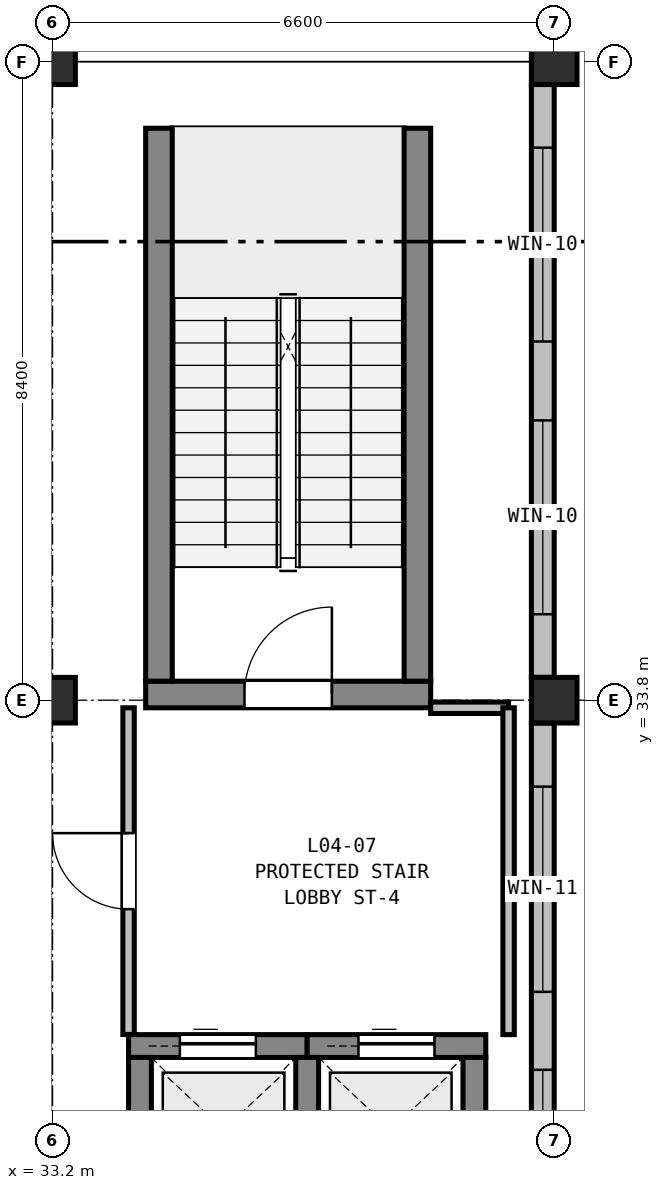
"""IFC4 building model, lengths in metres.
Left out: names, types, materials, properties, quantities, classifications, styles, units other than length and angle.
Written with IfcOpenShell. Run it as: python <this file> out.ifc"""

import sys

from ifc_helpers import new_model, si_unit, direction, frame, frame_2d, origin, origin_2d, place, context, subcontext, project, spatial, rectangle, extrude, element, fill, save


model = new_model("IFC4")
c1 = context("Model", 3, precision=1e-05, world=origin(), true_north=direction((0.0, 1.0)))
c2 = subcontext(c1, "Body", "Model", "MODEL_VIEW")
j1 = project(units=[si_unit("LENGTHUNIT", "METRE"), si_unit("PLANEANGLEUNIT", "RADIAN")], contexts=[c1])
p1 = place(None, origin())
s1 = spatial("IfcSite", under=j1, at=p1, CompositionType="ELEMENT")
p2 = place(p1, origin())
s2 = spatial("IfcBuilding", under=s1, at=p2, CompositionType="ELEMENT")
p3 = place(p2, frame((0.0, 0.0, 19.5)))
s3 = spatial("IfcBuildingStorey", under=s2, at=p3, CompositionType="ELEMENT", Elevation=19.5)
for number, where, z_axis, x_axis in (
    (1, (33.2, 33.8, 0.0), (0.0, 0.0, 1.0), (1.0, 0.0, 0.0)),
    (2, (33.2, 42.2, 0.0), (0.0, 0.0, 1.0), (1.0, 0.0, 0.0)),
    (3, (39.8, 33.8, 0.0), (0.0, 0.0, 1.0), (1.0, 0.0, 0.0)),
    (4, (39.8, 42.2, 0.0), (0.0, 0.0, 1.0), (1.0, 0.0, 0.0)),
):
    element("IfcColumn", number, at=place(p3, frame(where, z_axis=z_axis, x_axis=x_axis)), inside=s3, PredefinedType="COLUMN", context=c2, shape_type="SweptSolid", body=[
        extrude(rectangle(XDim=0.6, YDim=0.6, at=origin_2d()), origin(), (0.0, 0.0, 1.0), 4.5),
    ])
p4 = place(p3, frame((34.425, 33.875, 0.0), z_axis=(0.0, 0.0, 1.0), x_axis=(1.0, 0.0, 0.0)))
e5 = element("IfcWall", 5, at=p4, inside=s3, PredefinedType="SHEAR", context=c2, shape_type="SweptSolid", body=[
    extrude(rectangle(XDim=3.75, YDim=0.35, at=frame_2d((1.875, 0.0))), origin(), (0.0, 0.0, 1.0), 4.5),
])
p5 = place(p4, frame((1.3, 0.0, 0.0)))
e6 = element("IfcOpeningElement", 6, at=p5, cuts=e5, PredefinedType="OPENING", context=c2, shape_type="SweptSolid", body=[
    extrude(rectangle(XDim=1.15, YDim=2.15, at=frame_2d((0.575, 1.075))), frame((0.0, 0.185, 0.0), z_axis=(0.0, -1.0, 0.0), x_axis=(1.0, 0.0, 0.0)), (0.0, 0.0, 1.0), 0.37),
])
p6 = place(p3, frame((34.425, 41.5, 0.0), z_axis=(0.0, 0.0, 1.0), x_axis=(1.0, 0.0, 0.0)))
e7 = element("IfcWall", 7, at=p6, inside=s3, PredefinedType="SHEAR", context=c2, shape_type="SweptSolid", body=[
    extrude(rectangle(XDim=3.75, YDim=0.35, at=frame_2d((1.875, 0.0))), origin(), (0.0, 0.0, 1.0), 4.5),
])
for number, where, z_axis, x_axis in (
    (8, (34.6, 34.05, 0.0), (0.0, 0.0, 1.0), (0.0, 1.0, 0.0)),
    (9, (38.0, 34.05, 0.0), (0.0, 0.0, 1.0), (0.0, 1.0, 0.0)),
):
    element("IfcWall", number, at=place(p3, frame(where, z_axis=z_axis, x_axis=x_axis)), inside=s3, PredefinedType="SHEAR", context=c2, shape_type="SweptSolid", body=[
        extrude(rectangle(XDim=7.275, YDim=0.35, at=frame_2d((3.637, 0.0))), origin(), (0.0, 0.0, 1.0), 4.5),
    ])
p7 = place(p3, frame((34.2, 29.25, 0.0), z_axis=(0.0, 0.0, 1.0), x_axis=(1.0, 0.0, 0.0)))
e10 = element("IfcWall", 10, at=p7, inside=s3, PredefinedType="SHEAR", context=c2, shape_type="SweptSolid", body=[
    extrude(rectangle(XDim=2.35, YDim=0.3, at=frame_2d((1.175, 0.0))), origin(), (0.0, 0.0, 1.0), 4.5),
])
p8 = place(p7, frame((0.675, 0.0, 0.0)))
e11 = element("IfcOpeningElement", 11, at=p8, cuts=e10, PredefinedType="OPENING", context=c2, shape_type="SweptSolid", body=[
    extrude(rectangle(XDim=1.0, YDim=2.1, at=frame_2d((0.5, 1.05))), frame((0.0, 0.16, 0.0), z_axis=(0.0, -1.0, 0.0), x_axis=(1.0, 0.0, 0.0)), (0.0, 0.0, 1.0), 0.32),
])
p9 = place(p3, frame((36.55, 29.25, 0.0), z_axis=(0.0, 0.0, 1.0), x_axis=(1.0, 0.0, 0.0)))
e12 = element("IfcWall", 12, at=p9, inside=s3, PredefinedType="SHEAR", context=c2, shape_type="SweptSolid", body=[
    extrude(rectangle(XDim=2.35, YDim=0.3, at=frame_2d((1.175, 0.0))), origin(), (0.0, 0.0, 1.0), 4.5),
])
p10 = place(p9, frame((0.675, 0.0, 0.0)))
e13 = element("IfcOpeningElement", 13, at=p10, cuts=e12, PredefinedType="OPENING", context=c2, shape_type="SweptSolid", body=[
    extrude(rectangle(XDim=1.0, YDim=2.1, at=frame_2d((0.5, 1.05))), frame((0.0, 0.16, 0.0), z_axis=(0.0, -1.0, 0.0), x_axis=(1.0, 0.0, 0.0)), (0.0, 0.0, 1.0), 0.32),
])
for number, where, z_axis, x_axis in (
    (14, (34.35, 27.2, 0.0), (0.0, 0.0, 1.0), (0.0, 1.0, 0.0)),
    (15, (36.55, 27.2, 0.0), (0.0, 0.0, 1.0), (0.0, 1.0, 0.0)),
    (16, (38.75, 27.2, 0.0), (0.0, 0.0, 1.0), (0.0, 1.0, 0.0)),
):
    element("IfcWall", number, at=place(p3, frame(where, z_axis=z_axis, x_axis=x_axis)), inside=s3, PredefinedType="SHEAR", context=c2, shape_type="SweptSolid", body=[
        extrude(rectangle(XDim=1.9, YDim=0.3, at=frame_2d((0.95, 0.0))), origin(), (0.0, 0.0, 1.0), 4.5),
    ])
p11 = place(p3, frame((33.2, 42.05, 0.0), z_axis=(0.0, 0.0, 1.0), x_axis=(1.0, 0.0, 0.0)))
e17 = element("IfcWall", 17, at=p11, inside=s3, PredefinedType="STANDARD", context=c2, shape_type="SweptSolid", body=[
    extrude(rectangle(XDim=6.6, YDim=0.3, at=frame_2d((3.3, 0.0))), origin(), (0.0, 0.0, 1.0), 3.735),
])
p12 = place(p11, frame((1.24, 0.0, 0.9)))
e18 = element("IfcOpeningElement", 18, at=p12, cuts=e17, PredefinedType="OPENING", context=c2, shape_type="SweptSolid", body=[
    extrude(rectangle(XDim=2.4, YDim=2.1, at=frame_2d((1.2, 1.05))), frame((0.0, 0.16, 0.0), z_axis=(0.0, -1.0, 0.0), x_axis=(1.0, 0.0, 0.0)), (0.0, 0.0, 1.0), 0.32),
])
p13 = place(p3, frame((39.65, 41.9, 0.0), z_axis=(0.0, 0.0, 1.0), x_axis=(0.0, -1.0, 0.0)))
e19 = element("IfcWall", 19, at=p13, inside=s3, PredefinedType="STANDARD", context=c2, shape_type="SweptSolid", body=[
    extrude(rectangle(XDim=7.8, YDim=0.3, at=frame_2d((3.9, 0.0))), origin(), (0.0, 0.0, 1.0), 3.885),
])
p14 = place(p13, frame((0.831, 0.0, 0.75)))
e20 = element("IfcOpeningElement", 20, at=p14, cuts=e19, PredefinedType="OPENING", context=c2, shape_type="SweptSolid", body=[
    extrude(rectangle(XDim=2.55, YDim=2.15, at=frame_2d((1.275, 1.075))), frame((0.0, 0.16, 0.0), z_axis=(0.0, -1.0, 0.0), x_axis=(1.0, 0.0, 0.0)), (0.0, 0.0, 1.0), 0.32),
])
p15 = place(p13, frame((4.419, 0.0, 0.75)))
e21 = element("IfcOpeningElement", 21, at=p15, cuts=e19, PredefinedType="OPENING", context=c2, shape_type="SweptSolid", body=[
    extrude(rectangle(XDim=2.55, YDim=2.15, at=frame_2d((1.275, 1.075))), frame((0.0, 0.16, 0.0), z_axis=(0.0, -1.0, 0.0), x_axis=(1.0, 0.0, 0.0)), (0.0, 0.0, 1.0), 0.32),
])
p16 = place(p3, frame((39.65, 33.5, 0.0), z_axis=(0.0, 0.0, 1.0), x_axis=(0.0, -1.0, 0.0)))
e22 = element("IfcWall", 22, at=p16, inside=s3, PredefinedType="STANDARD", context=c2, shape_type="SweptSolid", body=[
    extrude(rectangle(XDim=8.1, YDim=0.3, at=frame_2d((4.05, 0.0))), origin(), (0.0, 0.0, 1.0), 3.885),
])
p17 = place(p16, frame((0.837, 0.0, 0.75)))
e23 = element("IfcOpeningElement", 23, at=p17, cuts=e22, PredefinedType="OPENING", context=c2, shape_type="SweptSolid", body=[
    extrude(rectangle(XDim=2.7, YDim=2.2, at=frame_2d((1.35, 1.1))), frame((0.0, 0.16, 0.0), z_axis=(0.0, -1.0, 0.0), x_axis=(1.0, 0.0, 0.0)), (0.0, 0.0, 1.0), 0.32),
])
p18 = place(p16, frame((4.563, 0.0, 0.75)))
e24 = element("IfcOpeningElement", 24, at=p18, cuts=e22, PredefinedType="OPENING", context=c2, shape_type="SweptSolid", body=[
    extrude(rectangle(XDim=2.7, YDim=2.2, at=frame_2d((1.35, 1.1))), frame((0.0, 0.16, 0.0), z_axis=(0.0, -1.0, 0.0), x_axis=(1.0, 0.0, 0.0)), (0.0, 0.0, 1.0), 0.32),
])
p19 = place(p3, frame((38.175, 33.7, 0.0), z_axis=(0.0, 0.0, 1.0), x_axis=(1.0, 0.0, 0.0)))
e25 = element("IfcWall", 25, at=p19, inside=s3, PredefinedType="PARTITIONING", context=c2, shape_type="SweptSolid", body=[
    extrude(rectangle(XDim=1.025, YDim=0.15, at=frame_2d((0.512, 0.0))), origin(), (0.0, 0.0, 1.0), 3.885),
])
p20 = place(p3, frame((39.2, 33.7, 0.0), z_axis=(0.0, 0.0, 1.0), x_axis=(0.0, -1.0, 0.0)))
e26 = element("IfcWall", 26, at=p20, inside=s3, PredefinedType="PARTITIONING", context=c2, shape_type="SweptSolid", body=[
    extrude(rectangle(XDim=4.3, YDim=0.15, at=frame_2d((2.15, 0.0))), origin(), (0.0, 0.0, 1.0), 3.885),
])
p21 = place(p3, frame((34.2, 29.402, 0.0), z_axis=(0.0, 0.0, 1.0), x_axis=(0.0, 1.0, 0.0)))
e27 = element("IfcWall", 27, at=p21, inside=s3, PredefinedType="PARTITIONING", context=c2, shape_type="SweptSolid", body=[
    extrude(rectangle(XDim=4.298, YDim=0.15, at=frame_2d((2.149, 0.0))), origin(), (0.0, 0.0, 1.0), 3.885),
])
p22 = place(p21, frame((1.649, 0.0, 0.0)))
e28 = element("IfcOpeningElement", 28, at=p22, cuts=e27, PredefinedType="OPENING", context=c2, shape_type="SweptSolid", body=[
    extrude(rectangle(XDim=1.0, YDim=2.1, at=frame_2d((0.5, 1.05))), frame((0.0, 0.085, 0.0), z_axis=(0.0, -1.0, 0.0), x_axis=(1.0, 0.0, 0.0)), (0.0, 0.0, 1.0), 0.17),
])
p23 = place(p12, origin())
e29 = element("IfcWindow", 29, at=p23, inside=s3, PartitioningType="SINGLE_PANEL", PredefinedType="WINDOW", context=c2, shape_type="SweptSolid", body=[
    extrude(rectangle(XDim=2.4, YDim=2.1, at=frame_2d((1.2, 1.05))), frame((0.0, 0.03, 0.0), z_axis=(0.0, -1.0, 0.0), x_axis=(1.0, 0.0, 0.0)), (0.0, 0.0, 1.0), 0.06),
])
fill(e18, e29)
p24 = place(p14, origin())
e30 = element("IfcWindow", 30, at=p24, inside=s3, PartitioningType="SINGLE_PANEL", PredefinedType="WINDOW", context=c2, shape_type="SweptSolid", body=[
    extrude(rectangle(XDim=2.55, YDim=2.15, at=frame_2d((1.275, 1.075))), frame((0.0, 0.03, 0.0), z_axis=(0.0, -1.0, 0.0), x_axis=(1.0, 0.0, 0.0)), (0.0, 0.0, 1.0), 0.06),
])
fill(e20, e30)
p25 = place(p15, origin())
e31 = element("IfcWindow", 31, at=p25, inside=s3, PartitioningType="SINGLE_PANEL", PredefinedType="WINDOW", context=c2, shape_type="SweptSolid", body=[
    extrude(rectangle(XDim=2.55, YDim=2.15, at=frame_2d((1.275, 1.075))), frame((0.0, 0.03, 0.0), z_axis=(0.0, -1.0, 0.0), x_axis=(1.0, 0.0, 0.0)), (0.0, 0.0, 1.0), 0.06),
])
fill(e21, e31)
p26 = place(p17, origin())
e32 = element("IfcWindow", 32, at=p26, inside=s3, PartitioningType="SINGLE_PANEL", PredefinedType="WINDOW", context=c2, shape_type="SweptSolid", body=[
    extrude(rectangle(XDim=2.7, YDim=2.2, at=frame_2d((1.35, 1.1))), frame((0.0, 0.03, 0.0), z_axis=(0.0, -1.0, 0.0), x_axis=(1.0, 0.0, 0.0)), (0.0, 0.0, 1.0), 0.06),
])
fill(e23, e32)
p27 = place(p18, origin())
e33 = element("IfcWindow", 33, at=p27, inside=s3, PartitioningType="SINGLE_PANEL", PredefinedType="WINDOW", context=c2, shape_type="SweptSolid", body=[
    extrude(rectangle(XDim=2.7, YDim=2.2, at=frame_2d((1.35, 1.1))), frame((0.0, 0.03, 0.0), z_axis=(0.0, -1.0, 0.0), x_axis=(1.0, 0.0, 0.0)), (0.0, 0.0, 1.0), 0.06),
])
fill(e24, e33)
p28 = place(p5, origin())
e34 = element("IfcDoor", 34, at=p28, inside=s3, OperationType="SINGLE_SWING_RIGHT", PredefinedType="DOOR", context=c2, shape_type="SweptSolid", body=[
    extrude(rectangle(XDim=1.15, YDim=2.15, at=frame_2d((0.575, 1.075))), frame((0.0, 0.025, 0.0), z_axis=(0.0, -1.0, 0.0), x_axis=(1.0, 0.0, 0.0)), (0.0, 0.0, 1.0), 0.05),
])
fill(e6, e34)
p29 = place(p8, origin())
e35 = element("IfcDoor", 35, at=p29, inside=s3, OperationType="SLIDING_TO_LEFT", PredefinedType="DOOR", context=c2, shape_type="SweptSolid", body=[
    extrude(rectangle(XDim=1.0, YDim=2.1, at=frame_2d((0.5, 1.05))), frame((0.0, 0.025, 0.0), z_axis=(0.0, -1.0, 0.0), x_axis=(1.0, 0.0, 0.0)), (0.0, 0.0, 1.0), 0.05),
])
fill(e11, e35)
p30 = place(p10, origin())
e36 = element("IfcDoor", 36, at=p30, inside=s3, OperationType="SLIDING_TO_LEFT", PredefinedType="DOOR", context=c2, shape_type="SweptSolid", body=[
    extrude(rectangle(XDim=1.0, YDim=2.1, at=frame_2d((0.5, 1.05))), frame((0.0, 0.025, 0.0), z_axis=(0.0, -1.0, 0.0), x_axis=(1.0, 0.0, 0.0)), (0.0, 0.0, 1.0), 0.05),
])
fill(e13, e36)
p31 = place(p22, origin())
e37 = element("IfcDoor", 37, at=p31, inside=s3, OperationType="SINGLE_SWING_RIGHT", PredefinedType="DOOR", context=c2, shape_type="SweptSolid", body=[
    extrude(rectangle(XDim=1.0, YDim=2.1, at=frame_2d((0.5, 1.05))), frame((0.0, 0.025, 0.0), z_axis=(0.0, -1.0, 0.0), x_axis=(1.0, 0.0, 0.0)), (0.0, 0.0, 1.0), 0.05),
])
fill(e28, e37)
save(model, sys.argv[1])
